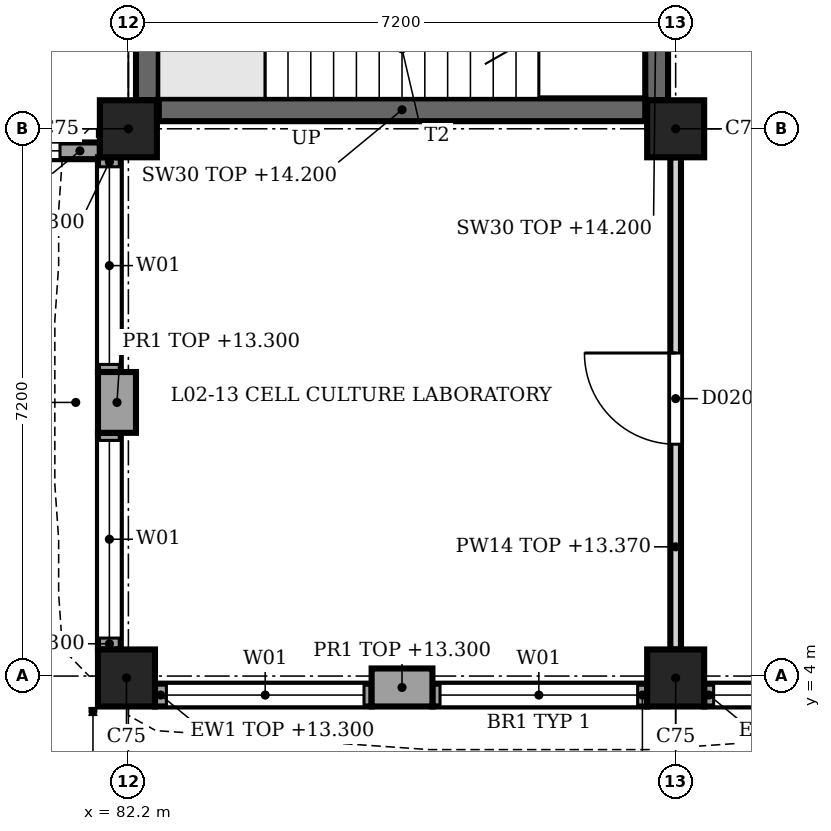
"""IFC4 building model, lengths in metres.
Left out: names, types, materials, properties, quantities, classifications, styles, units other than length and angle.
Written with IfcOpenShell. Run it as: python <this file> out.ifc"""

import sys

from ifc_helpers import new_model, si_unit, direction, frame, frame_2d, origin, origin_2d, place, context, subcontext, project, spatial, rectangle, extrude, element, fill, save


model = new_model("IFC4")
c1 = context("Model", 3, precision=1e-05, world=origin(), true_north=direction((0.0, 1.0)))
c2 = subcontext(c1, "Body", "Model", "MODEL_VIEW")
j1 = project(units=[si_unit("LENGTHUNIT", "METRE"), si_unit("PLANEANGLEUNIT", "RADIAN")], contexts=[c1])
p1 = place(None, origin())
s1 = spatial("IfcSite", under=j1, at=p1, CompositionType="ELEMENT")
p2 = place(p1, origin())
s2 = spatial("IfcBuilding", under=s1, at=p2, CompositionType="ELEMENT")
p3 = place(p2, frame((0.0, 0.0, 9.9)))
s3 = spatial("IfcBuildingStorey", under=s2, at=p3, CompositionType="ELEMENT", Elevation=9.9)
for number, where, z_axis, x_axis in (
    (1, (82.175, 3.975, 0.0), (0.0, 0.0, 1.0), (1.0, 0.0, 0.0)),
    (2, (82.2, 11.2, 0.0), (0.0, 0.0, 1.0), (1.0, 0.0, 0.0)),
    (3, (89.4, 3.975, 0.0), (0.0, 0.0, 1.0), (1.0, 0.0, 0.0)),
    (4, (89.4, 11.2, 0.0), (0.0, 0.0, 1.0), (1.0, 0.0, 0.0)),
):
    element("IfcColumn", number, at=place(p3, frame(where, z_axis=z_axis, x_axis=x_axis)), inside=s3, PredefinedType="COLUMN", context=c2, shape_type="SweptSolid", body=[
        extrude(rectangle(XDim=0.75, YDim=0.75, at=origin_2d()), origin(), (0.0, 0.0, 1.0), 4.5),
    ])
p4 = place(p3, frame((86.2, 3.85, 0.0), z_axis=(0.0, 0.0, 1.0), x_axis=(-1.0, 0.0, 0.0)))
e5 = element("IfcWall", 5, at=p4, inside=s3, PredefinedType="SOLIDWALL", context=c2, shape_type="SweptSolid", body=[
    extrude(rectangle(XDim=0.8, YDim=0.5, at=frame_2d((0.4, 0.0))), origin(), (0.0, 0.0, 1.0), 3.4),
])
p5 = place(p3, frame((92.6, 3.75, 0.0), z_axis=(0.0, 0.0, 1.0), x_axis=(-1.0, 0.0, 0.0)))
e6 = element("IfcWall", 6, at=p5, inside=s3, PredefinedType="SOLIDWALL", context=c2, shape_type="SweptSolid", body=[
    extrude(rectangle(XDim=2.825, YDim=0.3, at=frame_2d((1.413, 0.0))), origin(), (0.0, 0.0, 1.0), 3.4),
])
p6 = place(p5, frame((0.1, 0.0, 0.9)))
e7 = element("IfcOpeningElement", 7, at=p6, cuts=e6, PredefinedType="OPENING", context=c2, shape_type="SweptSolid", body=[
    extrude(rectangle(XDim=2.6, YDim=2.4, at=frame_2d((1.3, 1.2))), frame((0.0, 0.16, 0.0), z_axis=(0.0, -1.0, 0.0), x_axis=(1.0, 0.0, 0.0)), (0.0, 0.0, 1.0), 0.32),
])
p7 = place(p3, frame((89.025, 3.75, 0.0), z_axis=(0.0, 0.0, 1.0), x_axis=(-1.0, 0.0, 0.0)))
e8 = element("IfcWall", 8, at=p7, inside=s3, PredefinedType="SOLIDWALL", context=c2, shape_type="SweptSolid", body=[
    extrude(rectangle(XDim=2.825, YDim=0.3, at=frame_2d((1.413, 0.0))), origin(), (0.0, 0.0, 1.0), 3.4),
])
p8 = place(p7, frame((0.125, 0.0, 0.9)))
e9 = element("IfcOpeningElement", 9, at=p8, cuts=e8, PredefinedType="OPENING", context=c2, shape_type="SweptSolid", body=[
    extrude(rectangle(XDim=2.6, YDim=2.4, at=frame_2d((1.3, 1.2))), frame((0.0, 0.16, 0.0), z_axis=(0.0, -1.0, 0.0), x_axis=(1.0, 0.0, 0.0)), (0.0, 0.0, 1.0), 0.32),
])
p9 = place(p3, frame((85.4, 3.75, 0.0), z_axis=(0.0, 0.0, 1.0), x_axis=(-1.0, 0.0, 0.0)))
e10 = element("IfcWall", 10, at=p9, inside=s3, PredefinedType="SOLIDWALL", context=c2, shape_type="SweptSolid", body=[
    extrude(rectangle(XDim=2.85, YDim=0.3, at=frame_2d((1.425, 0.0))), origin(), (0.0, 0.0, 1.0), 3.4),
])
p10 = place(p9, frame((0.1, 0.0, 0.9)))
e11 = element("IfcOpeningElement", 11, at=p10, cuts=e10, PredefinedType="OPENING", context=c2, shape_type="SweptSolid", body=[
    extrude(rectangle(XDim=2.6, YDim=2.4, at=frame_2d((1.3, 1.2))), frame((0.0, 0.16, 0.0), z_axis=(0.0, -1.0, 0.0), x_axis=(1.0, 0.0, 0.0)), (0.0, 0.0, 1.0), 0.32),
])
p11 = place(p3, frame((82.05, 7.2, 0.0), z_axis=(0.0, 0.0, 1.0), x_axis=(0.0, 1.0, 0.0)))
e12 = element("IfcWall", 12, at=p11, inside=s3, PredefinedType="SOLIDWALL", context=c2, shape_type="SweptSolid", body=[
    extrude(rectangle(XDim=0.8, YDim=0.5, at=frame_2d((0.4, 0.0))), origin(), (0.0, 0.0, 1.0), 3.4),
])
p12 = place(p3, frame((81.95, 4.35, 0.0), z_axis=(0.0, 0.0, 1.0), x_axis=(0.0, 1.0, 0.0)))
e13 = element("IfcWall", 13, at=p12, inside=s3, PredefinedType="SOLIDWALL", context=c2, shape_type="SweptSolid", body=[
    extrude(rectangle(XDim=2.85, YDim=0.3, at=frame_2d((1.425, 0.0))), origin(), (0.0, 0.0, 1.0), 3.4),
])
p13 = place(p12, frame((0.15, 0.0, 0.9)))
e14 = element("IfcOpeningElement", 14, at=p13, cuts=e13, PredefinedType="OPENING", context=c2, shape_type="SweptSolid", body=[
    extrude(rectangle(XDim=2.6, YDim=2.4, at=frame_2d((1.3, 1.2))), frame((0.0, 0.16, 0.0), z_axis=(0.0, -1.0, 0.0), x_axis=(1.0, 0.0, 0.0)), (0.0, 0.0, 1.0), 0.32),
])
p14 = place(p3, frame((81.95, 8.0, 0.0), z_axis=(0.0, 0.0, 1.0), x_axis=(0.0, 1.0, 0.0)))
e15 = element("IfcWall", 15, at=p14, inside=s3, PredefinedType="SOLIDWALL", context=c2, shape_type="SweptSolid", body=[
    extrude(rectangle(XDim=2.825, YDim=0.3, at=frame_2d((1.413, 0.0))), origin(), (0.0, 0.0, 1.0), 3.4),
])
p15 = place(p14, frame((0.1, 0.0, 0.9)))
e16 = element("IfcOpeningElement", 16, at=p15, cuts=e15, PredefinedType="OPENING", context=c2, shape_type="SweptSolid", body=[
    extrude(rectangle(XDim=2.6, YDim=2.4, at=frame_2d((1.3, 1.2))), frame((0.0, 0.16, 0.0), z_axis=(0.0, -1.0, 0.0), x_axis=(1.0, 0.0, 0.0)), (0.0, 0.0, 1.0), 0.32),
])
p16 = place(p3, frame((81.825, 10.91, 0.0), z_axis=(0.0, 0.0, 1.0), x_axis=(-1.0, 0.0, 0.0)))
e17 = element("IfcWall", 17, at=p16, inside=s3, PredefinedType="SOLIDWALL", context=c2, shape_type="SweptSolid", body=[
    extrude(rectangle(XDim=2.825, YDim=0.22, at=frame_2d((1.413, 0.0))), origin(), (0.0, 0.0, 1.0), 3.4),
])
p17 = place(p16, frame((0.525, 0.0, 0.9)))
e18 = element("IfcOpeningElement", 18, at=p17, cuts=e17, PredefinedType="OPENING", context=c2, shape_type="SweptSolid", body=[
    extrude(rectangle(XDim=1.8, YDim=2.4, at=frame_2d((0.9, 1.2))), frame((0.0, 0.12, 0.0), z_axis=(0.0, -1.0, 0.0), x_axis=(1.0, 0.0, 0.0)), (0.0, 0.0, 1.0), 0.24),
])
p18 = place(p3, frame((28.6, 3.74, 1.2), z_axis=(0.0, 0.0, 1.0), x_axis=(1.0, 0.0, 0.0)))
e19 = element("IfcWall", 19, at=p18, inside=s3, PredefinedType="PARAPET", context=c2, shape_type="SweptSolid", body=[
    extrude(rectangle(XDim=53.2, YDim=0.28, at=frame_2d((26.6, 0.0))), origin(), (0.0, 0.0, 1.0), 0.9),
])
p19 = place(p3, frame((89.15, 11.575, 0.0), z_axis=(0.0, 0.0, 1.0), x_axis=(0.0, 1.0, 0.0)))
e20 = element("IfcWall", 20, at=p19, inside=s3, PredefinedType="SHEAR", context=c2, shape_type="SweptSolid", body=[
    extrude(rectangle(XDim=6.45, YDim=0.3, at=frame_2d((3.225, 0.0))), origin(), (0.0, 0.0, 1.0), 4.3),
])
p20 = place(p19, frame((4.225, 0.0, 0.0)))
e21 = element("IfcOpeningElement", 21, at=p20, cuts=e20, PredefinedType="OPENING", context=c2, shape_type="SweptSolid", body=[
    extrude(rectangle(XDim=1.2, YDim=2.1, at=frame_2d((0.6, 1.05))), frame((0.0, 0.16, 0.0), z_axis=(0.0, -1.0, 0.0), x_axis=(1.0, 0.0, 0.0)), (0.0, 0.0, 1.0), 0.32),
])
p21 = place(p3, frame((82.45, 11.575, 0.0), z_axis=(0.0, 0.0, 1.0), x_axis=(0.0, 1.0, 0.0)))
e22 = element("IfcWall", 22, at=p21, inside=s3, PredefinedType="SHEAR", context=c2, shape_type="SweptSolid", body=[
    extrude(rectangle(XDim=6.45, YDim=0.3, at=frame_2d((3.225, 0.0))), origin(), (0.0, 0.0, 1.0), 4.3),
])
p22 = place(p3, frame((82.6, 11.45, 0.0), z_axis=(0.0, 0.0, 1.0), x_axis=(1.0, 0.0, 0.0)))
e23 = element("IfcWall", 23, at=p22, inside=s3, PredefinedType="SHEAR", context=c2, shape_type="SweptSolid", body=[
    extrude(rectangle(XDim=6.4, YDim=0.3, at=frame_2d((3.2, 0.0))), origin(), (0.0, 0.0, 1.0), 4.3),
])
p23 = place(p3, frame((89.4, 4.35, 0.0), z_axis=(0.0, 0.0, 1.0), x_axis=(0.0, 1.0, 0.0)))
e24 = element("IfcWall", 24, at=p23, inside=s3, PredefinedType="PARTITIONING", context=c2, shape_type="SweptSolid", body=[
    extrude(rectangle(XDim=6.475, YDim=0.14, at=frame_2d((3.237, 0.0))), origin(), (0.0, 0.0, 1.0), 3.47),
])
p24 = place(p23, frame((2.7, 0.0, 0.0)))
e25 = element("IfcOpeningElement", 25, at=p24, cuts=e24, PredefinedType="OPENING", context=c2, shape_type="SweptSolid", body=[
    extrude(rectangle(XDim=1.2, YDim=2.2, at=frame_2d((0.6, 1.1))), frame((0.0, 0.08, 0.0), z_axis=(0.0, -1.0, 0.0), x_axis=(1.0, 0.0, 0.0)), (0.0, 0.0, 1.0), 0.16),
])
p25 = place(p6, origin())
e26 = element("IfcWindow", 26, at=p25, inside=s3, PartitioningType="SINGLE_PANEL", PredefinedType="WINDOW", context=c2, shape_type="SweptSolid", body=[
    extrude(rectangle(XDim=2.6, YDim=2.4, at=frame_2d((1.3, 1.2))), frame((0.0, 0.03, 0.0), z_axis=(0.0, -1.0, 0.0), x_axis=(1.0, 0.0, 0.0)), (0.0, 0.0, 1.0), 0.06),
])
fill(e7, e26)
p26 = place(p8, origin())
e27 = element("IfcWindow", 27, at=p26, inside=s3, PartitioningType="SINGLE_PANEL", PredefinedType="WINDOW", context=c2, shape_type="SweptSolid", body=[
    extrude(rectangle(XDim=2.6, YDim=2.4, at=frame_2d((1.3, 1.2))), frame((0.0, 0.03, 0.0), z_axis=(0.0, -1.0, 0.0), x_axis=(1.0, 0.0, 0.0)), (0.0, 0.0, 1.0), 0.06),
])
fill(e9, e27)
p27 = place(p10, origin())
e28 = element("IfcWindow", 28, at=p27, inside=s3, PartitioningType="SINGLE_PANEL", PredefinedType="WINDOW", context=c2, shape_type="SweptSolid", body=[
    extrude(rectangle(XDim=2.6, YDim=2.4, at=frame_2d((1.3, 1.2))), frame((0.0, 0.03, 0.0), z_axis=(0.0, -1.0, 0.0), x_axis=(1.0, 0.0, 0.0)), (0.0, 0.0, 1.0), 0.06),
])
fill(e11, e28)
p28 = place(p13, origin())
e29 = element("IfcWindow", 29, at=p28, inside=s3, PartitioningType="SINGLE_PANEL", PredefinedType="WINDOW", context=c2, shape_type="SweptSolid", body=[
    extrude(rectangle(XDim=2.6, YDim=2.4, at=frame_2d((1.3, 1.2))), frame((0.0, 0.03, 0.0), z_axis=(0.0, -1.0, 0.0), x_axis=(1.0, 0.0, 0.0)), (0.0, 0.0, 1.0), 0.06),
])
fill(e14, e29)
p29 = place(p15, origin())
e30 = element("IfcWindow", 30, at=p29, inside=s3, PartitioningType="SINGLE_PANEL", PredefinedType="WINDOW", context=c2, shape_type="SweptSolid", body=[
    extrude(rectangle(XDim=2.6, YDim=2.4, at=frame_2d((1.3, 1.2))), frame((0.0, 0.03, 0.0), z_axis=(0.0, -1.0, 0.0), x_axis=(1.0, 0.0, 0.0)), (0.0, 0.0, 1.0), 0.06),
])
fill(e16, e30)
p30 = place(p17, origin())
e31 = element("IfcWindow", 31, at=p30, inside=s3, PartitioningType="SINGLE_PANEL", PredefinedType="WINDOW", context=c2, shape_type="SweptSolid", body=[
    extrude(rectangle(XDim=1.8, YDim=2.4, at=frame_2d((0.9, 1.2))), frame((0.0, 0.03, 0.0), z_axis=(0.0, -1.0, 0.0), x_axis=(1.0, 0.0, 0.0)), (0.0, 0.0, 1.0), 0.06),
])
fill(e18, e31)
p31 = place(p24, origin())
e32 = element("IfcDoor", 32, at=p31, inside=s3, OperationType="SINGLE_SWING_RIGHT", PredefinedType="DOOR", context=c2, shape_type="SweptSolid", body=[
    extrude(rectangle(XDim=1.2, YDim=2.2, at=frame_2d((0.6, 1.1))), frame((0.0, 0.025, 0.0), z_axis=(0.0, -1.0, 0.0), x_axis=(1.0, 0.0, 0.0)), (0.0, 0.0, 1.0), 0.05),
])
fill(e25, e32)
save(model, sys.argv[1])
